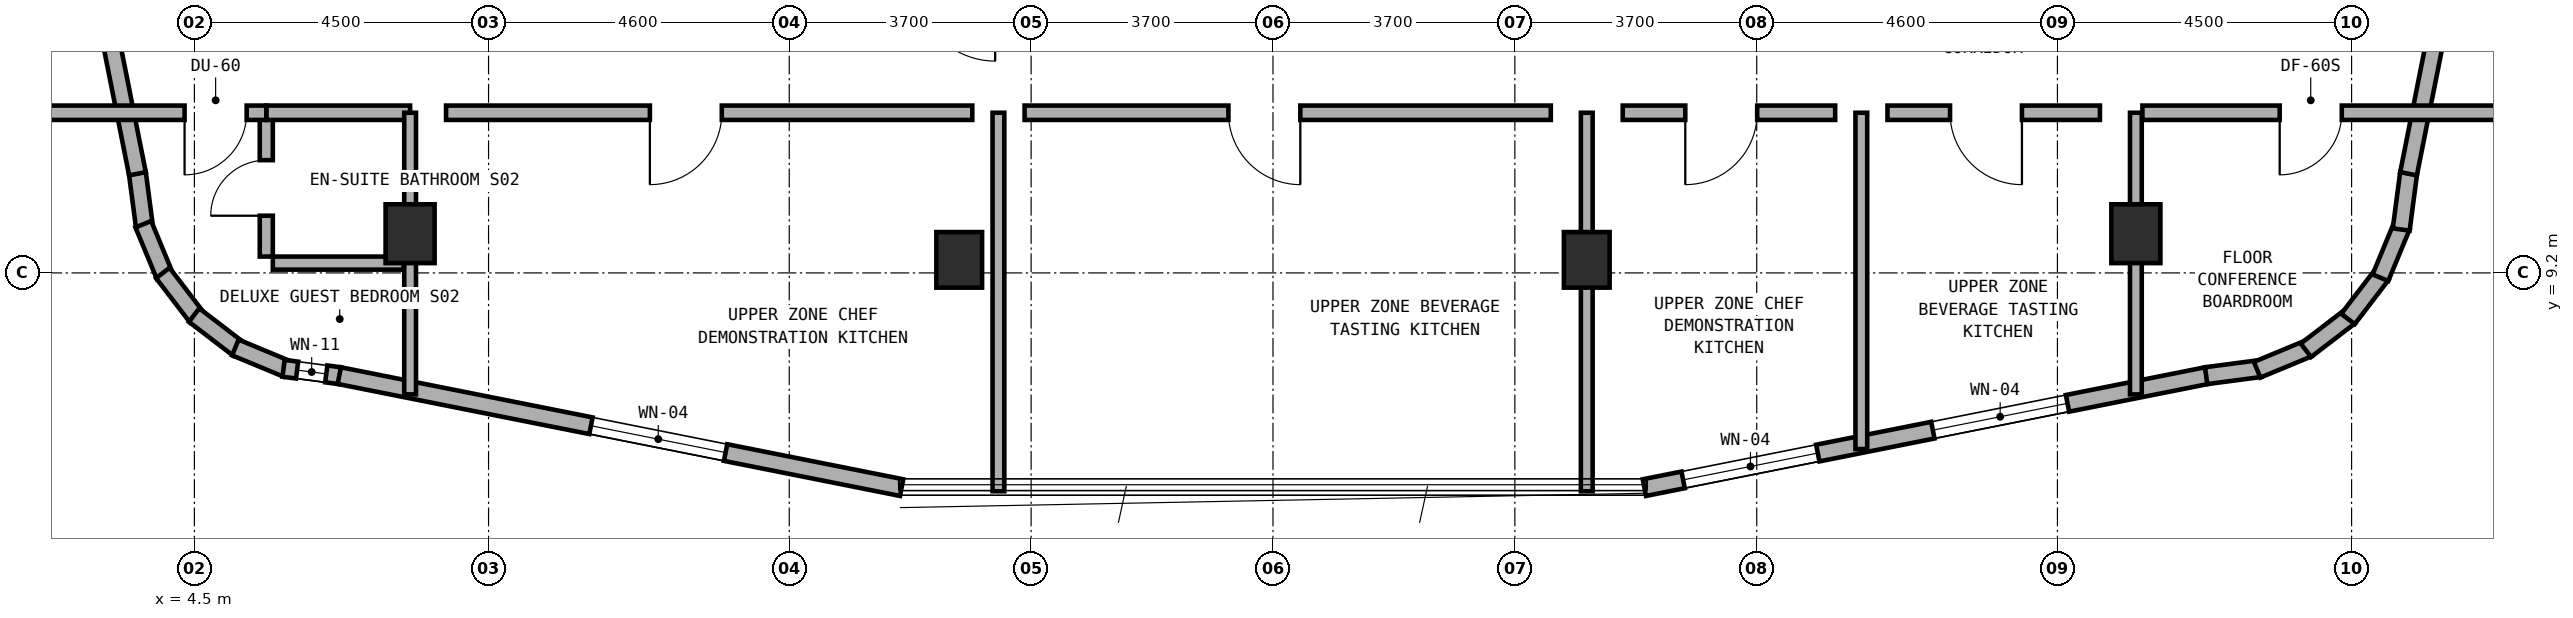
"""IFC4 building model, lengths in metres.
Left out: names, types, materials, properties, quantities, classifications, styles, units other than length and angle.
Written with IfcOpenShell. Run it as: python <this file> out.ifc"""

import sys

from ifc_helpers import new_model, si_unit, direction, frame, frame_2d, origin, origin_2d, place, context, subcontext, project, spatial, rectangle, extrude, element, fill, save


model = new_model("IFC4")
c1 = context("Model", 3, precision=1e-05, world=origin(), true_north=direction((0.0, 1.0)))
c2 = subcontext(c1, "Body", "Model", "MODEL_VIEW")
j1 = project(units=[si_unit("LENGTHUNIT", "METRE"), si_unit("PLANEANGLEUNIT", "RADIAN")], contexts=[c1])
p1 = place(None, origin())
s1 = spatial("IfcSite", under=j1, at=p1, CompositionType="ELEMENT")
p2 = place(p1, origin())
s2 = spatial("IfcBuilding", under=s1, at=p2, CompositionType="ELEMENT")
p3 = place(p2, frame((0.0, 0.0, 209.9)))
s3 = spatial("IfcBuildingStorey", under=s2, at=p3, CompositionType="ELEMENT", Elevation=209.9)
for number, where, z_axis, x_axis in (
    (1, (16.2, 9.4, 0.0), (0.0, 0.0, 1.0), (1.0, 0.0, 0.0)),
    (2, (25.8, 9.4, 0.0), (0.0, 0.0, 1.0), (1.0, 0.0, 0.0)),
):
    element("IfcColumn", number, at=place(p3, frame(where, z_axis=z_axis, x_axis=x_axis)), inside=s3, PredefinedType="COLUMN", context=c2, shape_type="SweptSolid", body=[
        extrude(rectangle(XDim=0.7, YDim=0.85, at=origin_2d()), origin(), (0.0, 0.0, 1.0), 3.6),
    ])
for number, where, z_axis, x_axis in (
    (3, (7.8, 9.8, 0.0), (0.0, 0.0, 1.0), (1.0, 0.0, 0.0)),
    (4, (34.2, 9.8, 0.0), (0.0, 0.0, 1.0), (1.0, 0.0, 0.0)),
):
    element("IfcColumn", number, at=place(p3, frame(where, z_axis=z_axis, x_axis=x_axis)), inside=s3, PredefinedType="COLUMN", context=c2, shape_type="SweptSolid", body=[
        extrude(rectangle(XDim=0.75, YDim=0.9, at=origin_2d()), origin(), (0.0, 0.0, 1.0), 3.6),
    ])
p4 = place(p3, frame((3.628, 10.725, 0.0), z_axis=(0.0, 0.0, 1.0), x_axis=(0.130954667764, -0.9913883573, 0.0)))
e5 = element("IfcWall", 5, at=p4, inside=s3, PredefinedType="STANDARD", context=c2, shape_type="SweptSolid", body=[
    extrude(rectangle(XDim=0.833, YDim=0.26, at=frame_2d((0.417, 0.0))), origin(), (0.0, 0.0, 1.0), 3.32),
])
p5 = place(p3, frame((3.719, 9.945, 0.0), z_axis=(0.0, 0.0, 1.0), x_axis=(0.382985169477, -0.923754491172, 0.0)))
e6 = element("IfcWall", 6, at=p5, inside=s3, PredefinedType="STANDARD", context=c2, shape_type="SweptSolid", body=[
    extrude(rectangle(XDim=0.851, YDim=0.26, at=frame_2d((0.426, 0.0))), origin(), (0.0, 0.0, 1.0), 3.32),
])
for number, where, z_axis, x_axis in (
    (7, (4.017, 9.199, 0.0), (0.0, 0.0, 1.0), (0.608, -0.794, 0.0)),
    (8, (4.496, 8.555, 0.0), (0.0, 0.0, 1.0), (0.794, -0.608, 0.0)),
):
    element("IfcWall", number, at=place(p3, frame(where, z_axis=z_axis, x_axis=x_axis)), inside=s3, PredefinedType="STANDARD", context=c2, shape_type="SweptSolid", body=[
        extrude(rectangle(XDim=0.85, YDim=0.26, at=frame_2d((0.425, 0.0))), origin(), (0.0, 0.0, 1.0), 3.32),
    ])
p6 = place(p3, frame((5.127, 8.059, 0.0), z_axis=(0.0, 0.0, 1.0), x_axis=(0.923652976167, -0.383229930484, 0.0)))
e9 = element("IfcWall", 9, at=p6, inside=s3, PredefinedType="STANDARD", context=c2, shape_type="SweptSolid", body=[
    extrude(rectangle(XDim=0.851, YDim=0.26, at=frame_2d((0.426, 0.0))), origin(), (0.0, 0.0, 1.0), 3.32),
])
p7 = place(p3, frame((5.864, 7.741, 0.0), z_axis=(0.0, 0.0, 1.0), x_axis=(0.991493480548, -0.130156359936, 0.0)))
e10 = element("IfcWall", 10, at=p7, inside=s3, PredefinedType="STANDARD", context=c2, shape_type="SweptSolid", body=[
    extrude(rectangle(XDim=0.868, YDim=0.26, at=frame_2d((0.434, 0.0))), origin(), (0.0, 0.0, 1.0), 3.32),
])
p8 = place(p7, frame((0.209, 0.0, 0.85)))
e11 = element("IfcOpeningElement", 11, at=p8, cuts=e10, PredefinedType="OPENING", context=c2, shape_type="SweptSolid", body=[
    extrude(rectangle(XDim=0.45, YDim=1.5, at=frame_2d((0.225, 0.75))), frame((0.0, 0.14, 0.0), z_axis=(0.0, -1.0, 0.0), x_axis=(1.0, 0.0, 0.0)), (0.0, 0.0, 1.0), 0.28),
])
p9 = place(p3, frame((6.717, 7.629, 0.0), z_axis=(0.0, 0.0, 1.0), x_axis=(0.980745199176, -0.195291715883, 0.0)))
e12 = element("IfcWall", 12, at=p9, inside=s3, PredefinedType="STANDARD", context=c2, shape_type="SweptSolid", body=[
    extrude(rectangle(XDim=8.771, YDim=0.26, at=frame_2d((4.385, 0.0))), origin(), (0.0, 0.0, 1.0), 3.32),
])
p10 = place(p9, frame((3.925, 0.0, 0.85)))
e13 = element("IfcOpeningElement", 13, at=p10, cuts=e12, PredefinedType="OPENING", context=c2, shape_type="SweptSolid", body=[
    extrude(rectangle(XDim=2.1, YDim=1.5, at=frame_2d((1.05, 0.75))), frame((0.0, 0.14, 0.0), z_axis=(0.0, -1.0, 0.0), x_axis=(1.0, 0.0, 0.0)), (0.0, 0.0, 1.0), 0.28),
])
p11 = place(p3, frame((26.681, 5.916, 0.0), z_axis=(0.0, 0.0, 1.0), x_axis=(0.980745199176, 0.195291715883, 0.0)))
e14 = element("IfcWall", 14, at=p11, inside=s3, PredefinedType="STANDARD", context=c2, shape_type="SweptSolid", body=[
    extrude(rectangle(XDim=8.771, YDim=0.26, at=frame_2d((4.385, 0.0))), origin(), (0.0, 0.0, 1.0), 3.32),
])
p12 = place(p11, frame((0.605, 0.0, 0.85)))
e15 = element("IfcOpeningElement", 15, at=p12, cuts=e14, PredefinedType="OPENING", context=c2, shape_type="SweptSolid", body=[
    extrude(rectangle(XDim=2.1, YDim=1.5, at=frame_2d((1.05, 0.75))), frame((0.0, 0.14, 0.0), z_axis=(0.0, -1.0, 0.0), x_axis=(1.0, 0.0, 0.0)), (0.0, 0.0, 1.0), 0.28),
])
p13 = place(p11, frame((4.5, 0.0, 0.85)))
e16 = element("IfcOpeningElement", 16, at=p13, cuts=e14, PredefinedType="OPENING", context=c2, shape_type="SweptSolid", body=[
    extrude(rectangle(XDim=2.1, YDim=1.5, at=frame_2d((1.05, 0.75))), frame((0.0, 0.14, 0.0), z_axis=(0.0, -1.0, 0.0), x_axis=(1.0, 0.0, 0.0)), (0.0, 0.0, 1.0), 0.28),
])
p14 = place(p3, frame((35.275, 7.628, 0.0), z_axis=(0.0, 0.0, 1.0), x_axis=(0.9913883573, 0.130954667764, 0.0)))
e17 = element("IfcWall", 17, at=p14, inside=s3, PredefinedType="STANDARD", context=c2, shape_type="SweptSolid", body=[
    extrude(rectangle(XDim=0.833, YDim=0.26, at=frame_2d((0.417, 0.0))), origin(), (0.0, 0.0, 1.0), 3.32),
])
p15 = place(p3, frame((36.055, 7.719, 0.0), z_axis=(0.0, 0.0, 1.0), x_axis=(0.923754491172, 0.382985169477, 0.0)))
e18 = element("IfcWall", 18, at=p15, inside=s3, PredefinedType="STANDARD", context=c2, shape_type="SweptSolid", body=[
    extrude(rectangle(XDim=0.851, YDim=0.26, at=frame_2d((0.426, 0.0))), origin(), (0.0, 0.0, 1.0), 3.32),
])
for number, where, z_axis, x_axis in (
    (19, (36.801, 8.017, 0.0), (0.0, 0.0, 1.0), (0.794, 0.608, 0.0)),
    (20, (37.445, 8.496, 0.0), (0.0, 0.0, 1.0), (0.608, 0.794, 0.0)),
):
    element("IfcWall", number, at=place(p3, frame(where, z_axis=z_axis, x_axis=x_axis)), inside=s3, PredefinedType="STANDARD", context=c2, shape_type="SweptSolid", body=[
        extrude(rectangle(XDim=0.85, YDim=0.26, at=frame_2d((0.425, 0.0))), origin(), (0.0, 0.0, 1.0), 3.32),
    ])
p16 = place(p3, frame((37.941, 9.127, 0.0), z_axis=(0.0, 0.0, 1.0), x_axis=(0.383229930484, 0.923652976167, 0.0)))
e21 = element("IfcWall", 21, at=p16, inside=s3, PredefinedType="STANDARD", context=c2, shape_type="SweptSolid", body=[
    extrude(rectangle(XDim=0.851, YDim=0.26, at=frame_2d((0.426, 0.0))), origin(), (0.0, 0.0, 1.0), 3.32),
])
p17 = place(p3, frame((38.259, 9.864, 0.0), z_axis=(0.0, 0.0, 1.0), x_axis=(0.130156359936, 0.991493480548, 0.0)))
e22 = element("IfcWall", 22, at=p17, inside=s3, PredefinedType="STANDARD", context=c2, shape_type="SweptSolid", body=[
    extrude(rectangle(XDim=0.868, YDim=0.26, at=frame_2d((0.434, 0.0))), origin(), (0.0, 0.0, 1.0), 3.32),
])
p18 = place(p3, frame((38.371, 10.717, 0.0), z_axis=(0.0, 0.0, 1.0), x_axis=(0.195291715883, 0.980745199176, 0.0)))
e23 = element("IfcWall", 23, at=p18, inside=s3, PredefinedType="STANDARD", context=c2, shape_type="SweptSolid", body=[
    extrude(rectangle(XDim=8.771, YDim=0.26, at=frame_2d((4.385, 0.0))), origin(), (0.0, 0.0, 1.0), 3.32),
])
p19 = place(p18, frame((3.873, 0.0, 0.85)))
e24 = element("IfcOpeningElement", 24, at=p19, cuts=e23, PredefinedType="OPENING", context=c2, shape_type="SweptSolid", body=[
    extrude(rectangle(XDim=2.1, YDim=1.5, at=frame_2d((1.05, 0.75))), frame((0.0, 0.14, 0.0), z_axis=(0.0, -1.0, 0.0), x_axis=(1.0, 0.0, 0.0)), (0.0, 0.0, 1.0), 0.28),
])
p20 = place(p3, frame((1.916, 19.319, 0.0), z_axis=(0.0, 0.0, 1.0), x_axis=(0.195291715883, -0.980745199176, 0.0)))
e25 = element("IfcWall", 25, at=p20, inside=s3, PredefinedType="STANDARD", context=c2, shape_type="SweptSolid", body=[
    extrude(rectangle(XDim=8.771, YDim=0.26, at=frame_2d((4.385, 0.0))), origin(), (0.0, 0.0, 1.0), 3.32),
])
p21 = place(p20, frame((2.798, 0.0, 0.85)))
e26 = element("IfcOpeningElement", 26, at=p21, cuts=e25, PredefinedType="OPENING", context=c2, shape_type="SweptSolid", body=[
    extrude(rectangle(XDim=2.1, YDim=1.5, at=frame_2d((1.05, 0.75))), frame((0.0, 0.14, 0.0), z_axis=(0.0, -1.0, 0.0), x_axis=(1.0, 0.0, 0.0)), (0.0, 0.0, 1.0), 0.28),
])
p22 = place(p3, frame((5.6, 9.45, 0.0), z_axis=(0.0, 0.0, 1.0), x_axis=(0.0, 1.0, 0.0)))
e27 = element("IfcWall", 27, at=p22, inside=s3, PredefinedType="PLUMBINGWALL", context=c2, shape_type="SweptSolid", body=[
    extrude(rectangle(XDim=2.1, YDim=0.2, at=frame_2d((1.05, 0.0))), origin(), (0.0, 0.0, 1.0), 3.32),
])
p23 = place(p22, frame((0.625, 0.0, 0.0)))
e28 = element("IfcOpeningElement", 28, at=p23, cuts=e27, PredefinedType="OPENING", context=c2, shape_type="SweptSolid", body=[
    extrude(rectangle(XDim=0.85, YDim=2.1, at=frame_2d((0.425, 1.05))), frame((0.0, 0.11, 0.0), z_axis=(0.0, -1.0, 0.0), x_axis=(1.0, 0.0, 0.0)), (0.0, 0.0, 1.0), 0.22),
])
p24 = place(p3, frame((5.7, 9.35, 0.0), z_axis=(0.0, 0.0, 1.0), x_axis=(1.0, 0.0, 0.0)))
e29 = element("IfcWall", 29, at=p24, inside=s3, PredefinedType="PLUMBINGWALL", context=c2, shape_type="SweptSolid", body=[
    extrude(rectangle(XDim=2.0, YDim=0.2, at=frame_2d((1.0, 0.0))), origin(), (0.0, 0.0, 1.0), 3.32),
])
p25 = place(p3, frame((5.6, 11.65, 0.0), z_axis=(0.0, 0.0, 1.0), x_axis=(1.0, 0.0, 0.0)))
e30 = element("IfcWall", 30, at=p25, inside=s3, PredefinedType="SOLIDWALL", context=c2, shape_type="SweptSolid", body=[
    extrude(rectangle(XDim=2.2, YDim=0.22, at=frame_2d((1.1, 0.0))), origin(), (0.0, 0.0, 1.0), 2.695),
])
p26 = place(p3, frame((1.96, 11.65, 0.0), z_axis=(0.0, 0.0, 1.0), x_axis=(1.0, 0.0, 0.0)))
e31 = element("IfcWall", 31, at=p26, inside=s3, PredefinedType="SOLIDWALL", context=c2, shape_type="SweptSolid", body=[
    extrude(rectangle(XDim=3.64, YDim=0.22, at=frame_2d((1.82, 0.0))), origin(), (0.0, 0.0, 1.0), 3.32),
])
p27 = place(p26, frame((2.39, 0.0, 0.0)))
e32 = element("IfcOpeningElement", 32, at=p27, cuts=e31, PredefinedType="OPENING", context=c2, shape_type="SweptSolid", body=[
    extrude(rectangle(XDim=0.95, YDim=2.1, at=frame_2d((0.475, 1.05))), frame((0.0, 0.12, 0.0), z_axis=(0.0, -1.0, 0.0), x_axis=(1.0, 0.0, 0.0)), (0.0, 0.0, 1.0), 0.24),
])
p28 = place(p3, frame((7.8, 7.342, 0.0), z_axis=(0.0, 0.0, 1.0), x_axis=(0.0, 1.0, 0.0)))
e33 = element("IfcWall", 33, at=p28, inside=s3, PredefinedType="SOLIDWALL", context=c2, shape_type="SweptSolid", body=[
    extrude(rectangle(XDim=4.308, YDim=0.18, at=frame_2d((2.154, 0.0))), origin(), (0.0, 0.0, 1.0), 2.695),
])
p29 = place(p3, frame((16.8, 5.86, 0.0), z_axis=(0.0, 0.0, 1.0), x_axis=(0.0, 1.0, 0.0)))
e34 = element("IfcWall", 34, at=p29, inside=s3, PredefinedType="SOLIDWALL", context=c2, shape_type="SweptSolid", body=[
    extrude(rectangle(XDim=5.79, YDim=0.18, at=frame_2d((2.895, 0.0))), origin(), (0.0, 0.0, 1.0), 2.935),
])
p30 = place(p3, frame((8.35, 11.65, 0.0), z_axis=(0.0, 0.0, 1.0), x_axis=(1.0, 0.0, 0.0)))
e35 = element("IfcWall", 35, at=p30, inside=s3, PredefinedType="SOLIDWALL", context=c2, shape_type="SweptSolid", body=[
    extrude(rectangle(XDim=8.05, YDim=0.22, at=frame_2d((4.025, 0.0))), origin(), (0.0, 0.0, 1.0), 2.695),
])
p31 = place(p30, frame((3.118, 0.0, 0.0)))
e36 = element("IfcOpeningElement", 36, at=p31, cuts=e35, PredefinedType="OPENING", context=c2, shape_type="SweptSolid", body=[
    extrude(rectangle(XDim=1.1, YDim=2.1, at=frame_2d((0.55, 1.05))), frame((0.0, 0.12, 0.0), z_axis=(0.0, -1.0, 0.0), x_axis=(1.0, 0.0, 0.0)), (0.0, 0.0, 1.0), 0.24),
])
p32 = place(p3, frame((17.2, 11.65, 0.0), z_axis=(0.0, 0.0, 1.0), x_axis=(1.0, 0.0, 0.0)))
e37 = element("IfcWall", 37, at=p32, inside=s3, PredefinedType="SOLIDWALL", context=c2, shape_type="SweptSolid", body=[
    extrude(rectangle(XDim=8.05, YDim=0.22, at=frame_2d((4.025, 0.0))), origin(), (0.0, 0.0, 1.0), 3.32),
])
p33 = place(p32, frame((3.118, 0.0, 0.0)))
e38 = element("IfcOpeningElement", 38, at=p33, cuts=e37, PredefinedType="OPENING", context=c2, shape_type="SweptSolid", body=[
    extrude(rectangle(XDim=1.1, YDim=2.1, at=frame_2d((0.55, 1.05))), frame((0.0, 0.12, 0.0), z_axis=(0.0, -1.0, 0.0), x_axis=(1.0, 0.0, 0.0)), (0.0, 0.0, 1.0), 0.24),
])
p34 = place(p3, frame((25.8, 5.86, 0.0), z_axis=(0.0, 0.0, 1.0), x_axis=(0.0, 1.0, 0.0)))
e39 = element("IfcWall", 39, at=p34, inside=s3, PredefinedType="SOLIDWALL", context=c2, shape_type="SweptSolid", body=[
    extrude(rectangle(XDim=5.79, YDim=0.18, at=frame_2d((2.895, 0.0))), origin(), (0.0, 0.0, 1.0), 2.695),
])
p35 = place(p3, frame((30.0, 6.506, 0.0), z_axis=(0.0, 0.0, 1.0), x_axis=(0.0, 1.0, 0.0)))
e40 = element("IfcWall", 40, at=p35, inside=s3, PredefinedType="SOLIDWALL", context=c2, shape_type="SweptSolid", body=[
    extrude(rectangle(XDim=5.144, YDim=0.18, at=frame_2d((2.572, 0.0))), origin(), (0.0, 0.0, 1.0), 2.935),
])
p36 = place(p3, frame((26.35, 11.65, 0.0), z_axis=(0.0, 0.0, 1.0), x_axis=(1.0, 0.0, 0.0)))
e41 = element("IfcWall", 41, at=p36, inside=s3, PredefinedType="SOLIDWALL", context=c2, shape_type="SweptSolid", body=[
    extrude(rectangle(XDim=3.25, YDim=0.22, at=frame_2d((1.625, 0.0))), origin(), (0.0, 0.0, 1.0), 2.695),
])
p37 = place(p36, frame((0.957, 0.0, 0.0)))
e42 = element("IfcOpeningElement", 42, at=p37, cuts=e41, PredefinedType="OPENING", context=c2, shape_type="SweptSolid", body=[
    extrude(rectangle(XDim=1.1, YDim=2.1, at=frame_2d((0.55, 1.05))), frame((0.0, 0.12, 0.0), z_axis=(0.0, -1.0, 0.0), x_axis=(1.0, 0.0, 0.0)), (0.0, 0.0, 1.0), 0.24),
])
p38 = place(p3, frame((30.4, 11.65, 0.0), z_axis=(0.0, 0.0, 1.0), x_axis=(1.0, 0.0, 0.0)))
e43 = element("IfcWall", 43, at=p38, inside=s3, PredefinedType="SOLIDWALL", context=c2, shape_type="SweptSolid", body=[
    extrude(rectangle(XDim=3.25, YDim=0.22, at=frame_2d((1.625, 0.0))), origin(), (0.0, 0.0, 1.0), 3.32),
])
p39 = place(p38, frame((0.957, 0.0, 0.0)))
e44 = element("IfcOpeningElement", 44, at=p39, cuts=e43, PredefinedType="OPENING", context=c2, shape_type="SweptSolid", body=[
    extrude(rectangle(XDim=1.1, YDim=2.1, at=frame_2d((0.55, 1.05))), frame((0.0, 0.12, 0.0), z_axis=(0.0, -1.0, 0.0), x_axis=(1.0, 0.0, 0.0)), (0.0, 0.0, 1.0), 0.24),
])
p40 = place(p3, frame((34.2, 7.342, 0.0), z_axis=(0.0, 0.0, 1.0), x_axis=(0.0, 1.0, 0.0)))
e45 = element("IfcWall", 45, at=p40, inside=s3, PredefinedType="SOLIDWALL", context=c2, shape_type="SweptSolid", body=[
    extrude(rectangle(XDim=4.308, YDim=0.18, at=frame_2d((2.154, 0.0))), origin(), (0.0, 0.0, 1.0), 2.695),
])
p41 = place(p3, frame((34.3, 11.65, 0.0), z_axis=(0.0, 0.0, 1.0), x_axis=(1.0, 0.0, 0.0)))
e46 = element("IfcWall", 46, at=p41, inside=s3, PredefinedType="SOLIDWALL", context=c2, shape_type="SweptSolid", body=[
    extrude(rectangle(XDim=5.64, YDim=0.22, at=frame_2d((2.82, 0.0))), origin(), (0.0, 0.0, 1.0), 3.015),
])
p42 = place(p41, frame((2.1, 0.0, 0.0)))
e47 = element("IfcOpeningElement", 47, at=p42, cuts=e46, PredefinedType="OPENING", context=c2, shape_type="SweptSolid", body=[
    extrude(rectangle(XDim=0.95, YDim=2.1, at=frame_2d((0.475, 1.05))), frame((0.0, 0.12, 0.0), z_axis=(0.0, -1.0, 0.0), x_axis=(1.0, 0.0, 0.0)), (0.0, 0.0, 1.0), 0.24),
])
p43 = place(p10, origin())
e48 = element("IfcWindow", 48, at=p43, inside=s3, PartitioningType="SINGLE_PANEL", PredefinedType="WINDOW", context=c2, shape_type="SweptSolid", body=[
    extrude(rectangle(XDim=2.1, YDim=1.5, at=frame_2d((1.05, 0.75))), frame((0.0, 0.03, 0.0), z_axis=(0.0, -1.0, 0.0), x_axis=(1.0, 0.0, 0.0)), (0.0, 0.0, 1.0), 0.06),
])
fill(e13, e48)
p44 = place(p12, origin())
e49 = element("IfcWindow", 49, at=p44, inside=s3, PartitioningType="SINGLE_PANEL", PredefinedType="WINDOW", context=c2, shape_type="SweptSolid", body=[
    extrude(rectangle(XDim=2.1, YDim=1.5, at=frame_2d((1.05, 0.75))), frame((0.0, 0.03, 0.0), z_axis=(0.0, -1.0, 0.0), x_axis=(1.0, 0.0, 0.0)), (0.0, 0.0, 1.0), 0.06),
])
fill(e15, e49)
p45 = place(p13, origin())
e50 = element("IfcWindow", 50, at=p45, inside=s3, PartitioningType="SINGLE_PANEL", PredefinedType="WINDOW", context=c2, shape_type="SweptSolid", body=[
    extrude(rectangle(XDim=2.1, YDim=1.5, at=frame_2d((1.05, 0.75))), frame((0.0, 0.03, 0.0), z_axis=(0.0, -1.0, 0.0), x_axis=(1.0, 0.0, 0.0)), (0.0, 0.0, 1.0), 0.06),
])
fill(e16, e50)
p46 = place(p8, origin())
e51 = element("IfcWindow", 51, at=p46, inside=s3, PartitioningType="SINGLE_PANEL", PredefinedType="WINDOW", context=c2, shape_type="SweptSolid", body=[
    extrude(rectangle(XDim=0.45, YDim=1.5, at=frame_2d((0.225, 0.75))), frame((0.0, 0.03, 0.0), z_axis=(0.0, -1.0, 0.0), x_axis=(1.0, 0.0, 0.0)), (0.0, 0.0, 1.0), 0.06),
])
fill(e11, e51)
p47 = place(p23, origin())
e52 = element("IfcDoor", 52, at=p47, inside=s3, OperationType="SINGLE_SWING_LEFT", PredefinedType="DOOR", context=c2, shape_type="SweptSolid", body=[
    extrude(rectangle(XDim=0.85, YDim=2.1, at=frame_2d((0.425, 1.05))), frame((0.0, 0.025, 0.0), z_axis=(0.0, -1.0, 0.0), x_axis=(1.0, 0.0, 0.0)), (0.0, 0.0, 1.0), 0.05),
])
fill(e28, e52)
p48 = place(p27, frame((0.95, 0.0, 0.0), z_axis=(0.0, 0.0, 1.0), x_axis=(-1.0, 0.0, 0.0)))
e53 = element("IfcDoor", 53, at=p48, inside=s3, OperationType="SINGLE_SWING_RIGHT", PredefinedType="DOOR", context=c2, shape_type="SweptSolid", body=[
    extrude(rectangle(XDim=0.95, YDim=2.1, at=frame_2d((0.475, 1.05))), frame((0.0, 0.025, 0.0), z_axis=(0.0, -1.0, 0.0), x_axis=(1.0, 0.0, 0.0)), (0.0, 0.0, 1.0), 0.05),
])
fill(e32, e53)
p49 = place(p31, frame((1.1, 0.0, 0.0), z_axis=(0.0, 0.0, 1.0), x_axis=(-1.0, 0.0, 0.0)))
e54 = element("IfcDoor", 54, at=p49, inside=s3, OperationType="SINGLE_SWING_RIGHT", PredefinedType="DOOR", context=c2, shape_type="SweptSolid", body=[
    extrude(rectangle(XDim=1.1, YDim=2.1, at=frame_2d((0.55, 1.05))), frame((0.0, 0.025, 0.0), z_axis=(0.0, -1.0, 0.0), x_axis=(1.0, 0.0, 0.0)), (0.0, 0.0, 1.0), 0.05),
])
fill(e36, e54)
p50 = place(p33, frame((1.1, 0.0, 0.0), z_axis=(0.0, 0.0, 1.0), x_axis=(-1.0, 0.0, 0.0)))
e55 = element("IfcDoor", 55, at=p50, inside=s3, OperationType="SINGLE_SWING_LEFT", PredefinedType="DOOR", context=c2, shape_type="SweptSolid", body=[
    extrude(rectangle(XDim=1.1, YDim=2.1, at=frame_2d((0.55, 1.05))), frame((0.0, 0.025, 0.0), z_axis=(0.0, -1.0, 0.0), x_axis=(1.0, 0.0, 0.0)), (0.0, 0.0, 1.0), 0.05),
])
fill(e38, e55)
p51 = place(p37, frame((1.1, 0.0, 0.0), z_axis=(0.0, 0.0, 1.0), x_axis=(-1.0, 0.0, 0.0)))
e56 = element("IfcDoor", 56, at=p51, inside=s3, OperationType="SINGLE_SWING_RIGHT", PredefinedType="DOOR", context=c2, shape_type="SweptSolid", body=[
    extrude(rectangle(XDim=1.1, YDim=2.1, at=frame_2d((0.55, 1.05))), frame((0.0, 0.025, 0.0), z_axis=(0.0, -1.0, 0.0), x_axis=(1.0, 0.0, 0.0)), (0.0, 0.0, 1.0), 0.05),
])
fill(e42, e56)
p52 = place(p39, frame((1.1, 0.0, 0.0), z_axis=(0.0, 0.0, 1.0), x_axis=(-1.0, 0.0, 0.0)))
e57 = element("IfcDoor", 57, at=p52, inside=s3, OperationType="SINGLE_SWING_LEFT", PredefinedType="DOOR", context=c2, shape_type="SweptSolid", body=[
    extrude(rectangle(XDim=1.1, YDim=2.1, at=frame_2d((0.55, 1.05))), frame((0.0, 0.025, 0.0), z_axis=(0.0, -1.0, 0.0), x_axis=(1.0, 0.0, 0.0)), (0.0, 0.0, 1.0), 0.05),
])
fill(e44, e57)
p53 = place(p42, frame((0.95, 0.0, 0.0), z_axis=(0.0, 0.0, 1.0), x_axis=(-1.0, 0.0, 0.0)))
e58 = element("IfcDoor", 58, at=p53, inside=s3, OperationType="SINGLE_SWING_RIGHT", PredefinedType="DOOR", context=c2, shape_type="SweptSolid", body=[
    extrude(rectangle(XDim=0.95, YDim=2.1, at=frame_2d((0.475, 1.05))), frame((0.0, 0.025, 0.0), z_axis=(0.0, -1.0, 0.0), x_axis=(1.0, 0.0, 0.0)), (0.0, 0.0, 1.0), 0.05),
])
fill(e47, e58)
save(model, sys.argv[1])
